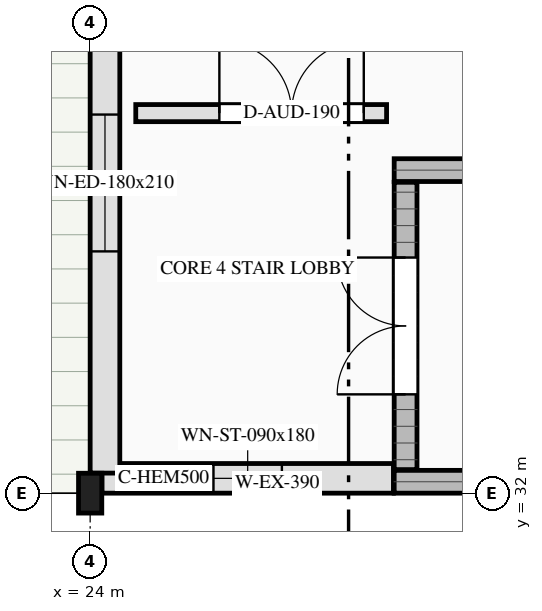
"""IFC4 building model, lengths in metres.
Left out: names, types, materials, properties, quantities, classifications, styles, units other than length and angle.
Written with IfcOpenShell. Run it as: python <this file> out.ifc"""

import sys

from ifc_helpers import new_model, si_unit, direction, frame, frame_2d, origin, origin_2d, place, context, subcontext, project, spatial, rectangle, i_section, extrude, element, fill, save


model = new_model("IFC4")
c1 = context("Model", 3, precision=1e-05, world=origin(), true_north=direction((0.0, 1.0)))
c2 = subcontext(c1, "Body", "Model", "MODEL_VIEW")
j1 = project(units=[si_unit("LENGTHUNIT", "METRE"), si_unit("PLANEANGLEUNIT", "RADIAN")], contexts=[c1])
p1 = place(None, origin())
s1 = spatial("IfcSite", under=j1, at=p1, CompositionType="ELEMENT")
p2 = place(p1, origin())
s2 = spatial("IfcBuilding", under=s1, at=p2, CompositionType="ELEMENT")
p3 = place(p2, frame((0.0, 0.0, 21.8)))
s3 = spatial("IfcBuildingStorey", under=s2, at=p3, CompositionType="ELEMENT", Elevation=21.8)
for number, where, z_axis, x_axis in (
    (1, (28.0, 32.15, 0.0), (0.0, 0.0, 1.0), (1.0, 0.0, 0.0)),
    (2, (28.0, 36.25, 0.0), (0.0, 0.0, 1.0), (1.0, 0.0, 0.0)),
):
    element("IfcWall", number, at=place(p3, frame(where, z_axis=z_axis, x_axis=x_axis)), inside=s3, PredefinedType="SHEAR", context=c2, shape_type="SweptSolid", body=[
        extrude(rectangle(XDim=10.0, YDim=0.3, at=frame_2d((5.0, 0.0))), origin(), (0.0, 0.0, 1.0), 4.2),
    ])
p4 = place(p3, frame((28.15, 32.31, 0.0), z_axis=(0.0, 0.0, 1.0), x_axis=(0.0, 1.0, 0.0)))
e3 = element("IfcWall", 3, at=p4, inside=s3, PredefinedType="SHEAR", context=c2, shape_type="SweptSolid", body=[
    extrude(rectangle(XDim=3.78, YDim=0.3, at=frame_2d((1.89, 0.0))), origin(), (0.0, 0.0, 1.0), 4.2),
])
p5 = place(p4, frame((0.99, 0.0, 0.0)))
e4 = element("IfcOpeningElement", 4, at=p5, cuts=e3, PredefinedType="OPENING", context=c2, shape_type="SweptSolid", body=[
    extrude(rectangle(XDim=1.8, YDim=2.2, at=frame_2d((0.9, 1.1))), frame((0.0, 0.16, 0.0), z_axis=(0.0, -1.0, 0.0), x_axis=(1.0, 0.0, 0.0)), (0.0, 0.0, 1.0), 0.32),
])
p6 = place(p3, frame((24.0, 32.0, 0.0), z_axis=(0.0, 0.0, 1.0), x_axis=(1.0, 0.0, 0.0)))
e5 = element("IfcColumn", 5, at=p6, inside=s3, PredefinedType="COLUMN", context=c2, shape_type="SweptSolid", body=[
    extrude(i_section(OverallWidth=0.306, OverallDepth=0.524, WebThickness=0.021, FlangeThickness=0.04, FilletRadius=0.027, at=origin_2d()), origin(), (0.0, 0.0, 1.0), 4.2),
])
p7 = place(p3, frame((27.99, 32.195, 0.0), z_axis=(0.0, 0.0, 1.0), x_axis=(-1.0, 0.0, 0.0)))
e6 = element("IfcWall", 6, at=p7, inside=s3, PredefinedType="SOLIDWALL", context=c2, shape_type="SweptSolid", body=[
    extrude(rectangle(XDim=3.835, YDim=0.39, at=frame_2d((1.917, 0.0))), origin(), (0.0, 0.0, 1.0), 3.92),
])
p8 = place(p7, frame((1.468, 0.0, 0.85)))
e7 = element("IfcOpeningElement", 7, at=p8, cuts=e6, PredefinedType="OPENING", context=c2, shape_type="SweptSolid", body=[
    extrude(rectangle(XDim=0.9, YDim=1.8, at=frame_2d((0.45, 0.9))), frame((0.0, 0.205, 0.0), z_axis=(0.0, -1.0, 0.0), x_axis=(1.0, 0.0, 0.0)), (0.0, 0.0, 1.0), 0.41),
])
p9 = place(p3, frame((24.195, 32.264, 0.0), z_axis=(0.0, 0.0, 1.0), x_axis=(0.0, 1.0, 0.0)))
e8 = element("IfcWall", 8, at=p9, inside=s3, PredefinedType="SOLIDWALL", context=c2, shape_type="SweptSolid", body=[
    extrude(rectangle(XDim=7.634, YDim=0.39, at=frame_2d((3.817, 0.0))), origin(), (0.0, 0.0, 1.0), 3.92),
])
p10 = place(p9, frame((2.917, 0.0, 0.85)))
e9 = element("IfcOpeningElement", 9, at=p10, cuts=e8, PredefinedType="OPENING", context=c2, shape_type="SweptSolid", body=[
    extrude(rectangle(XDim=1.8, YDim=2.1, at=frame_2d((0.9, 1.05))), frame((0.0, 0.205, 0.0), z_axis=(0.0, -1.0, 0.0), x_axis=(1.0, 0.0, 0.0)), (0.0, 0.0, 1.0), 0.41),
])
p11 = place(p3, frame((24.6, 37.0, 0.0), z_axis=(0.0, 0.0, 1.0), x_axis=(1.0, 0.0, 0.0)))
e10 = element("IfcWall", 10, at=p11, inside=s3, PredefinedType="SOLIDWALL", context=c2, shape_type="SweptSolid", body=[
    extrude(rectangle(XDim=3.3, YDim=0.225, at=frame_2d((1.65, 0.0))), origin(), (0.0, 0.0, 1.0), 3.92),
])
p12 = place(p11, frame((1.1, 0.0, 0.0)))
e11 = element("IfcOpeningElement", 11, at=p12, cuts=e10, PredefinedType="OPENING", context=c2, shape_type="SweptSolid", body=[
    extrude(rectangle(XDim=1.9, YDim=2.35, at=frame_2d((0.95, 1.175))), frame((0.0, 0.123, 0.0), z_axis=(0.0, -1.0, 0.0), x_axis=(1.0, 0.0, 0.0)), (0.0, 0.0, 1.0), 0.245),
])
p13 = place(p8, origin())
e12 = element("IfcWindow", 12, at=p13, inside=s3, PartitioningType="SINGLE_PANEL", PredefinedType="WINDOW", context=c2, shape_type="SweptSolid", body=[
    extrude(rectangle(XDim=0.9, YDim=1.8, at=frame_2d((0.45, 0.9))), frame((0.0, 0.03, 0.0), z_axis=(0.0, -1.0, 0.0), x_axis=(1.0, 0.0, 0.0)), (0.0, 0.0, 1.0), 0.06),
])
fill(e7, e12)
p14 = place(p10, origin())
e13 = element("IfcWindow", 13, at=p14, inside=s3, PartitioningType="DOUBLE_PANEL_VERTICAL", PredefinedType="WINDOW", context=c2, shape_type="SweptSolid", body=[
    extrude(rectangle(XDim=1.8, YDim=2.1, at=frame_2d((0.9, 1.05))), frame((0.0, 0.03, 0.0), z_axis=(0.0, -1.0, 0.0), x_axis=(1.0, 0.0, 0.0)), (0.0, 0.0, 1.0), 0.06),
])
fill(e9, e13)
p15 = place(p5, origin())
e14 = element("IfcDoor", 14, at=p15, inside=s3, OperationType="DOUBLE_DOOR_SINGLE_SWING", PredefinedType="DOOR", context=c2, shape_type="SweptSolid", body=[
    extrude(rectangle(XDim=1.8, YDim=2.2, at=frame_2d((0.9, 1.1))), frame((0.0, 0.025, 0.0), z_axis=(0.0, -1.0, 0.0), x_axis=(1.0, 0.0, 0.0)), (0.0, 0.0, 1.0), 0.05),
])
fill(e4, e14)
p16 = place(p12, origin())
e15 = element("IfcDoor", 15, at=p16, inside=s3, OperationType="DOUBLE_DOOR_SINGLE_SWING", PredefinedType="DOOR", context=c2, shape_type="SweptSolid", body=[
    extrude(rectangle(XDim=1.9, YDim=2.35, at=frame_2d((0.95, 1.175))), frame((0.0, 0.025, 0.0), z_axis=(0.0, -1.0, 0.0), x_axis=(1.0, 0.0, 0.0)), (0.0, 0.0, 1.0), 0.05),
])
fill(e11, e15)
save(model, sys.argv[1])
